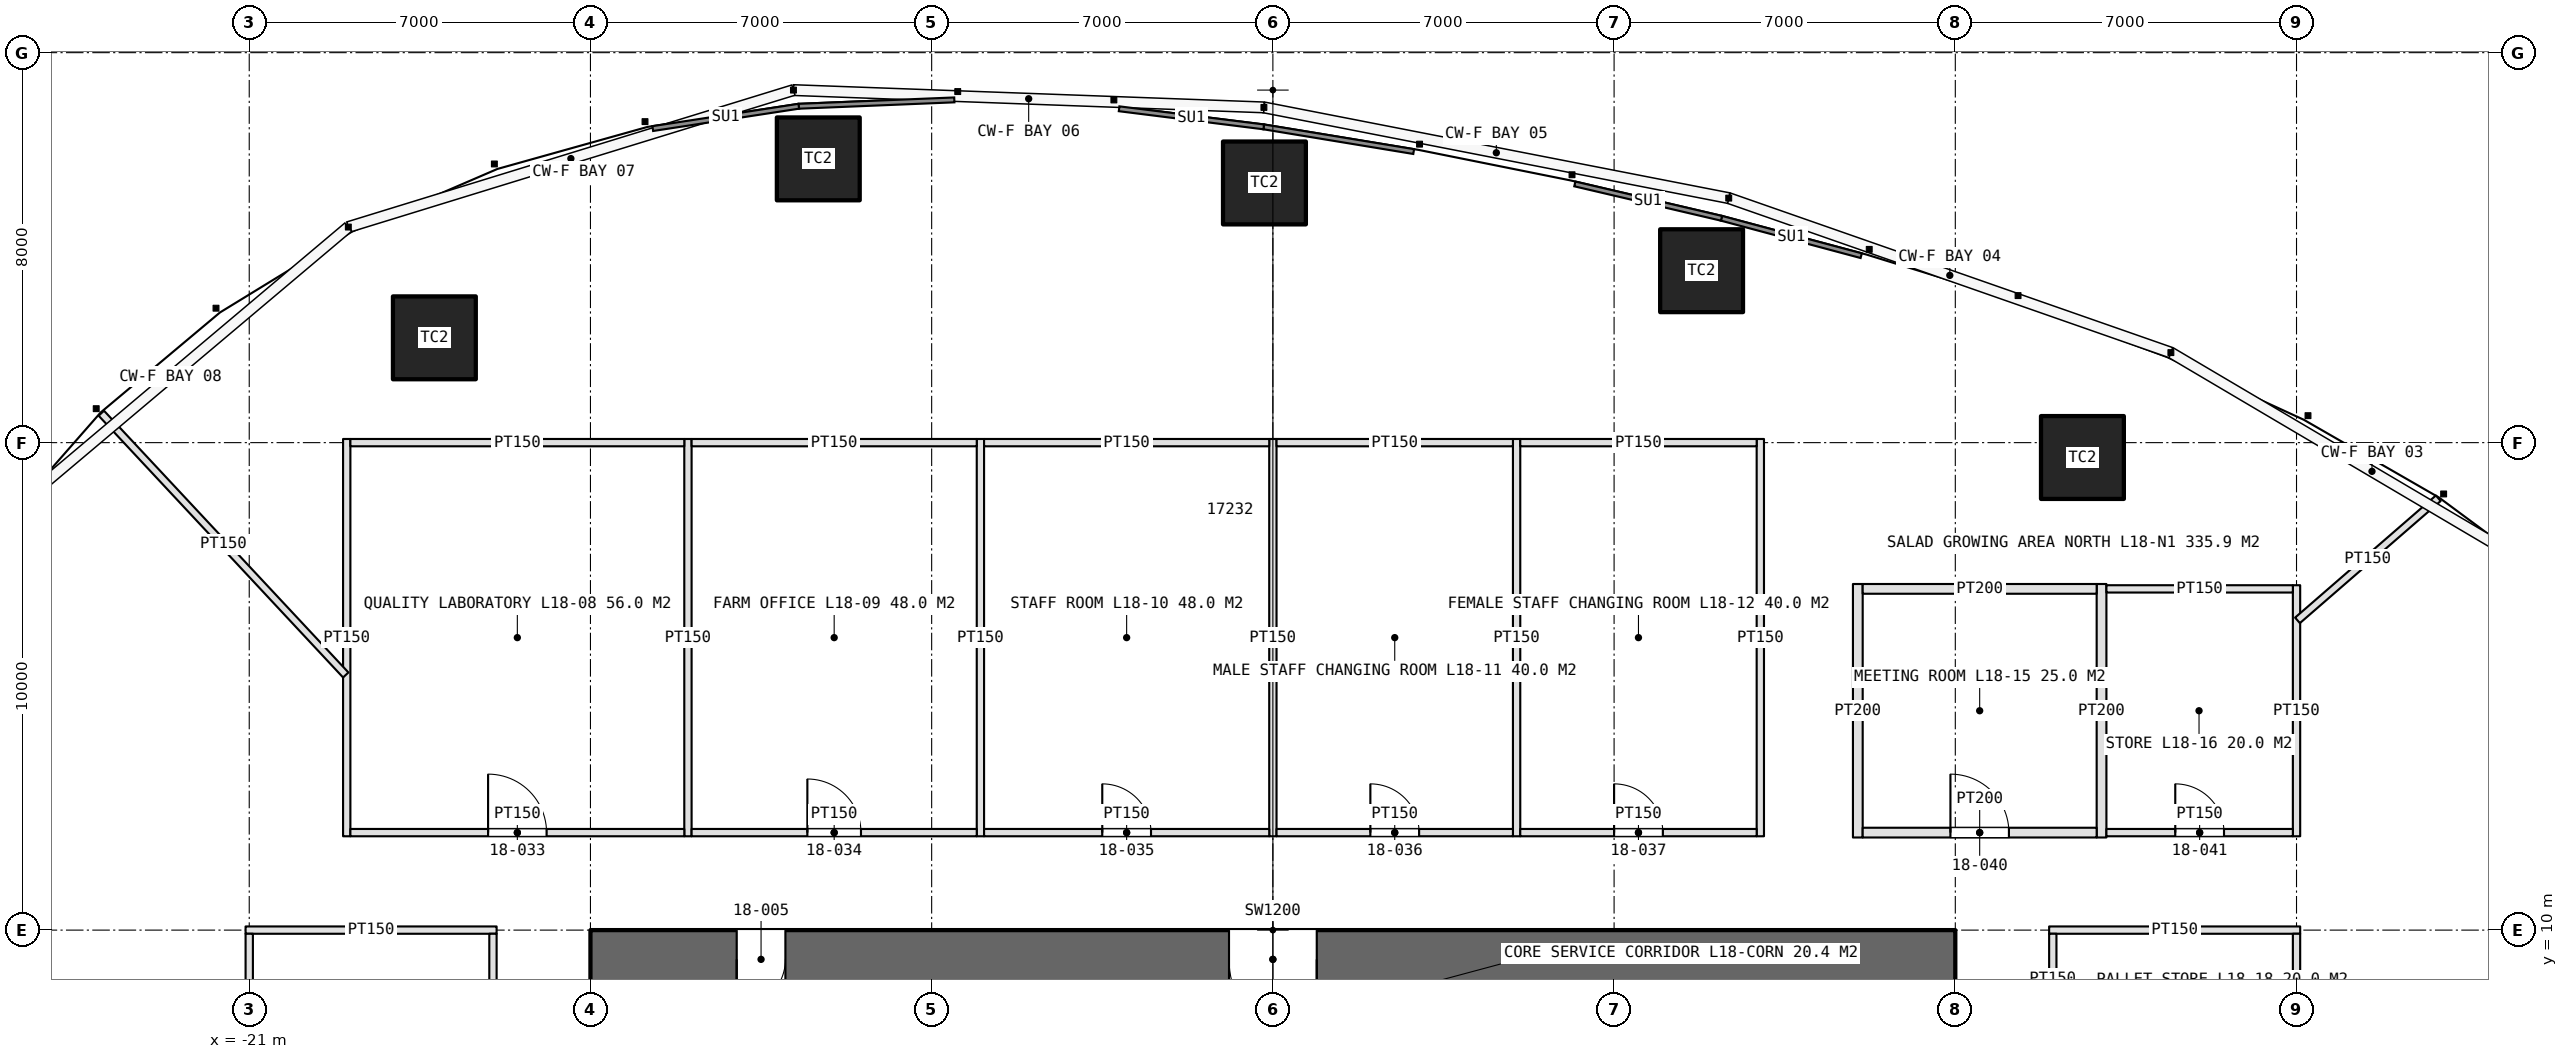
"""IFC4 building model, lengths in metres.
Left out: names, types, materials, properties, quantities, classifications, styles, units other than length and angle.
Written with IfcOpenShell. Run it as: python <this file> out.ifc"""

import sys

from ifc_helpers import new_model, si_unit, direction, frame, frame_2d, origin, origin_2d, place, context, subcontext, project, spatial, rectangle, extrude, element, fill, save


model = new_model("IFC4")
c1 = context("Model", 3, precision=1e-05, world=origin(), true_north=direction((0.0, 1.0)))
c2 = subcontext(c1, "Body", "Model", "MODEL_VIEW")
j1 = project(units=[si_unit("LENGTHUNIT", "METRE"), si_unit("PLANEANGLEUNIT", "RADIAN")], contexts=[c1])
p1 = place(None, origin())
s1 = spatial("IfcSite", under=j1, at=p1, CompositionType="ELEMENT")
p2 = place(p1, origin())
s2 = spatial("IfcBuilding", under=s1, at=p2, CompositionType="ELEMENT")
p3 = place(p2, frame((0.0, 0.0, 90.0)))
s3 = spatial("IfcBuildingStorey", under=s2, at=p3, CompositionType="ELEMENT", Elevation=90.0)
p4 = place(p3, frame((14.0, 9.4, 0.0), z_axis=(0.0, 0.0, 1.0), x_axis=(-1.0, 0.0, 0.0)))
e1 = element("IfcWall", 1, at=p4, inside=s3, PredefinedType="SHEAR", context=c2, shape_type="SweptSolid", body=[
    extrude(rectangle(XDim=28.0, YDim=1.2, at=frame_2d((14.0, 0.0))), origin(), (0.0, 0.0, 1.0), 5.0),
])
p5 = place(p4, frame((24.0, 0.0, 0.0)))
e2 = element("IfcOpeningElement", 2, at=p5, cuts=e1, PredefinedType="OPENING", context=c2, shape_type="SweptSolid", body=[
    extrude(rectangle(XDim=1.0, YDim=2.4, at=frame_2d((0.5, 1.2))), frame((0.0, 0.61, 0.0), z_axis=(0.0, -1.0, 0.0), x_axis=(1.0, 0.0, 0.0)), (0.0, 0.0, 1.0), 1.22),
])
p6 = place(p4, frame((13.1, 0.0, 0.0)))
e3 = element("IfcOpeningElement", 3, at=p6, cuts=e1, PredefinedType="OPENING", context=c2, shape_type="SweptSolid", body=[
    extrude(rectangle(XDim=1.8, YDim=2.4, at=frame_2d((0.9, 1.2))), frame((0.0, 0.61, 0.0), z_axis=(0.0, -1.0, 0.0), x_axis=(1.0, 0.0, 0.0)), (0.0, 0.0, 1.0), 1.22),
])
for number, where, z_axis, x_axis in (
    (4, (16.608, 19.695, 0.0), (0.0, 0.0, 1.0), (1.0, 0.0, 0.0)),
    (5, (8.795, 23.527, 0.0), (0.0, 0.0, 1.0), (1.0, 0.0, 0.0)),
    (6, (-0.173, 25.327, 0.0), (0.0, 0.0, 1.0), (1.0, 0.0, 0.0)),
    (7, (-9.326, 25.821, 0.0), (0.0, 0.0, 1.0), (1.0, 0.0, 0.0)),
    (8, (-17.202, 22.15, 0.0), (0.0, 0.0, 1.0), (1.0, 0.0, 0.0)),
):
    element("IfcColumn", number, at=place(p3, frame(where, z_axis=z_axis, x_axis=x_axis)), inside=s3, PredefinedType="COLUMN", context=c2, shape_type="SweptSolid", body=[
        extrude(rectangle(XDim=1.7, YDim=1.7, at=origin_2d()), origin(), (0.0, 0.0, 1.0), 5.0),
    ])
for number, where, z_axis, x_axis in (
    (9, (-19.0, 11.925, 0.0), (0.0, 0.0, 1.0), (0.0, 1.0, 0.0)),
    (10, (-12.0, 11.925, 0.0), (0.0, 0.0, 1.0), (0.0, 1.0, 0.0)),
    (11, (-6.0, 11.925, 0.0), (0.0, 0.0, 1.0), (0.0, 1.0, 0.0)),
    (12, (0.0, 11.925, 0.0), (0.0, 0.0, 1.0), (0.0, 1.0, 0.0)),
    (13, (5.0, 11.925, 0.0), (0.0, 0.0, 1.0), (0.0, 1.0, 0.0)),
    (14, (10.0, 11.925, 0.0), (0.0, 0.0, 1.0), (0.0, 1.0, 0.0)),
):
    element("IfcWall", number, at=place(p3, frame(where, z_axis=z_axis, x_axis=x_axis)), inside=s3, PredefinedType="PARTITIONING", context=c2, shape_type="SweptSolid", body=[
        extrude(rectangle(XDim=8.15, YDim=0.15, at=frame_2d((4.075, 0.0))), origin(), (0.0, 0.0, 1.0), 3.6),
    ])
p7 = place(p3, frame((-18.925, 12.0, 0.0), z_axis=(0.0, 0.0, 1.0), x_axis=(1.0, 0.0, 0.0)))
e15 = element("IfcWall", 15, at=p7, inside=s3, PredefinedType="PARTITIONING", context=c2, shape_type="SweptSolid", body=[
    extrude(rectangle(XDim=6.85, YDim=0.15, at=frame_2d((3.425, 0.0))), origin(), (0.0, 0.0, 1.0), 3.6),
])
p8 = place(p7, frame((2.825, 0.0, 0.0)))
e16 = element("IfcOpeningElement", 16, at=p8, cuts=e15, PredefinedType="OPENING", context=c2, shape_type="SweptSolid", body=[
    extrude(rectangle(XDim=1.2, YDim=2.3, at=frame_2d((0.6, 1.15))), frame((0.0, 0.085, 0.0), z_axis=(0.0, -1.0, 0.0), x_axis=(1.0, 0.0, 0.0)), (0.0, 0.0, 1.0), 0.17),
])
p9 = place(p3, frame((-18.925, 20.0, 0.0), z_axis=(0.0, 0.0, 1.0), x_axis=(1.0, 0.0, 0.0)))
e17 = element("IfcWall", 17, at=p9, inside=s3, PredefinedType="PARTITIONING", context=c2, shape_type="SweptSolid", body=[
    extrude(rectangle(XDim=6.85, YDim=0.15, at=frame_2d((3.425, 0.0))), origin(), (0.0, 0.0, 1.0), 3.6),
])
p10 = place(p3, frame((-11.925, 12.0, 0.0), z_axis=(0.0, 0.0, 1.0), x_axis=(1.0, 0.0, 0.0)))
e18 = element("IfcWall", 18, at=p10, inside=s3, PredefinedType="PARTITIONING", context=c2, shape_type="SweptSolid", body=[
    extrude(rectangle(XDim=5.85, YDim=0.15, at=frame_2d((2.925, 0.0))), origin(), (0.0, 0.0, 1.0), 3.6),
])
p11 = place(p10, frame((2.375, 0.0, 0.0)))
e19 = element("IfcOpeningElement", 19, at=p11, cuts=e18, PredefinedType="OPENING", context=c2, shape_type="SweptSolid", body=[
    extrude(rectangle(XDim=1.1, YDim=2.3, at=frame_2d((0.55, 1.15))), frame((0.0, 0.085, 0.0), z_axis=(0.0, -1.0, 0.0), x_axis=(1.0, 0.0, 0.0)), (0.0, 0.0, 1.0), 0.17),
])
p12 = place(p3, frame((-11.925, 20.0, 0.0), z_axis=(0.0, 0.0, 1.0), x_axis=(1.0, 0.0, 0.0)))
e20 = element("IfcWall", 20, at=p12, inside=s3, PredefinedType="PARTITIONING", context=c2, shape_type="SweptSolid", body=[
    extrude(rectangle(XDim=5.85, YDim=0.15, at=frame_2d((2.925, 0.0))), origin(), (0.0, 0.0, 1.0), 3.6),
])
p13 = place(p3, frame((-5.925, 12.0, 0.0), z_axis=(0.0, 0.0, 1.0), x_axis=(1.0, 0.0, 0.0)))
e21 = element("IfcWall", 21, at=p13, inside=s3, PredefinedType="PARTITIONING", context=c2, shape_type="SweptSolid", body=[
    extrude(rectangle(XDim=5.85, YDim=0.15, at=frame_2d((2.925, 0.0))), origin(), (0.0, 0.0, 1.0), 3.6),
])
p14 = place(p13, frame((2.425, 0.0, 0.0)))
e22 = element("IfcOpeningElement", 22, at=p14, cuts=e21, PredefinedType="OPENING", context=c2, shape_type="SweptSolid", body=[
    extrude(rectangle(XDim=1.0, YDim=2.2, at=frame_2d((0.5, 1.1))), frame((0.0, 0.085, 0.0), z_axis=(0.0, -1.0, 0.0), x_axis=(1.0, 0.0, 0.0)), (0.0, 0.0, 1.0), 0.17),
])
p15 = place(p3, frame((-5.925, 20.0, 0.0), z_axis=(0.0, 0.0, 1.0), x_axis=(1.0, 0.0, 0.0)))
e23 = element("IfcWall", 23, at=p15, inside=s3, PredefinedType="PARTITIONING", context=c2, shape_type="SweptSolid", body=[
    extrude(rectangle(XDim=5.85, YDim=0.15, at=frame_2d((2.925, 0.0))), origin(), (0.0, 0.0, 1.0), 3.6),
])
p16 = place(p3, frame((0.075, 12.0, 0.0), z_axis=(0.0, 0.0, 1.0), x_axis=(1.0, 0.0, 0.0)))
e24 = element("IfcWall", 24, at=p16, inside=s3, PredefinedType="PARTITIONING", context=c2, shape_type="SweptSolid", body=[
    extrude(rectangle(XDim=4.85, YDim=0.15, at=frame_2d((2.425, 0.0))), origin(), (0.0, 0.0, 1.0), 3.6),
])
p17 = place(p16, frame((1.925, 0.0, 0.0)))
e25 = element("IfcOpeningElement", 25, at=p17, cuts=e24, PredefinedType="OPENING", context=c2, shape_type="SweptSolid", body=[
    extrude(rectangle(XDim=1.0, YDim=2.2, at=frame_2d((0.5, 1.1))), frame((0.0, 0.085, 0.0), z_axis=(0.0, -1.0, 0.0), x_axis=(1.0, 0.0, 0.0)), (0.0, 0.0, 1.0), 0.17),
])
p18 = place(p3, frame((0.075, 20.0, 0.0), z_axis=(0.0, 0.0, 1.0), x_axis=(1.0, 0.0, 0.0)))
e26 = element("IfcWall", 26, at=p18, inside=s3, PredefinedType="PARTITIONING", context=c2, shape_type="SweptSolid", body=[
    extrude(rectangle(XDim=4.85, YDim=0.15, at=frame_2d((2.425, 0.0))), origin(), (0.0, 0.0, 1.0), 3.6),
])
p19 = place(p3, frame((5.075, 12.0, 0.0), z_axis=(0.0, 0.0, 1.0), x_axis=(1.0, 0.0, 0.0)))
e27 = element("IfcWall", 27, at=p19, inside=s3, PredefinedType="PARTITIONING", context=c2, shape_type="SweptSolid", body=[
    extrude(rectangle(XDim=4.85, YDim=0.15, at=frame_2d((2.425, 0.0))), origin(), (0.0, 0.0, 1.0), 3.6),
])
p20 = place(p19, frame((1.925, 0.0, 0.0)))
e28 = element("IfcOpeningElement", 28, at=p20, cuts=e27, PredefinedType="OPENING", context=c2, shape_type="SweptSolid", body=[
    extrude(rectangle(XDim=1.0, YDim=2.2, at=frame_2d((0.5, 1.1))), frame((0.0, 0.085, 0.0), z_axis=(0.0, -1.0, 0.0), x_axis=(1.0, 0.0, 0.0)), (0.0, 0.0, 1.0), 0.17),
])
p21 = place(p3, frame((5.075, 20.0, 0.0), z_axis=(0.0, 0.0, 1.0), x_axis=(1.0, 0.0, 0.0)))
e29 = element("IfcWall", 29, at=p21, inside=s3, PredefinedType="PARTITIONING", context=c2, shape_type="SweptSolid", body=[
    extrude(rectangle(XDim=4.85, YDim=0.15, at=frame_2d((2.425, 0.0))), origin(), (0.0, 0.0, 1.0), 3.6),
])
for number, where, z_axis, x_axis in (
    (30, (12.0, 11.9, 0.0), (0.0, 0.0, 1.0), (0.0, 1.0, 0.0)),
    (31, (17.0, 11.9, 0.0), (0.0, 0.0, 1.0), (0.0, 1.0, 0.0)),
):
    element("IfcWall", number, at=place(p3, frame(where, z_axis=z_axis, x_axis=x_axis)), inside=s3, PredefinedType="PARTITIONING", context=c2, shape_type="SweptSolid", body=[
        extrude(rectangle(XDim=5.2, YDim=0.2, at=frame_2d((2.6, 0.0))), origin(), (0.0, 0.0, 1.0), 3.6),
    ])
p22 = place(p3, frame((21.0, 11.925, 0.0), z_axis=(0.0, 0.0, 1.0), x_axis=(0.0, 1.0, 0.0)))
e32 = element("IfcWall", 32, at=p22, inside=s3, PredefinedType="PARTITIONING", context=c2, shape_type="SweptSolid", body=[
    extrude(rectangle(XDim=5.15, YDim=0.15, at=frame_2d((2.575, 0.0))), origin(), (0.0, 0.0, 1.0), 3.6),
])
p23 = place(p3, frame((12.1, 12.0, 0.0), z_axis=(0.0, 0.0, 1.0), x_axis=(1.0, 0.0, 0.0)))
e33 = element("IfcWall", 33, at=p23, inside=s3, PredefinedType="PARTITIONING", context=c2, shape_type="SweptSolid", body=[
    extrude(rectangle(XDim=4.8, YDim=0.2, at=frame_2d((2.4, 0.0))), origin(), (0.0, 0.0, 1.0), 3.6),
])
p24 = place(p23, frame((1.8, 0.0, 0.0)))
e34 = element("IfcOpeningElement", 34, at=p24, cuts=e33, PredefinedType="OPENING", context=c2, shape_type="SweptSolid", body=[
    extrude(rectangle(XDim=1.2, YDim=2.4, at=frame_2d((0.6, 1.2))), frame((0.0, 0.11, 0.0), z_axis=(0.0, -1.0, 0.0), x_axis=(1.0, 0.0, 0.0)), (0.0, 0.0, 1.0), 0.22),
])
p25 = place(p3, frame((12.1, 17.0, 0.0), z_axis=(0.0, 0.0, 1.0), x_axis=(1.0, 0.0, 0.0)))
e35 = element("IfcWall", 35, at=p25, inside=s3, PredefinedType="PARTITIONING", context=c2, shape_type="SweptSolid", body=[
    extrude(rectangle(XDim=4.8, YDim=0.2, at=frame_2d((2.4, 0.0))), origin(), (0.0, 0.0, 1.0), 3.6),
])
p26 = place(p3, frame((17.1, 12.0, 0.0), z_axis=(0.0, 0.0, 1.0), x_axis=(1.0, 0.0, 0.0)))
e36 = element("IfcWall", 36, at=p26, inside=s3, PredefinedType="PARTITIONING", context=c2, shape_type="SweptSolid", body=[
    extrude(rectangle(XDim=3.825, YDim=0.15, at=frame_2d((1.913, 0.0))), origin(), (0.0, 0.0, 1.0), 3.6),
])
p27 = place(p26, frame((1.413, 0.0, 0.0)))
e37 = element("IfcOpeningElement", 37, at=p27, cuts=e36, PredefinedType="OPENING", context=c2, shape_type="SweptSolid", body=[
    extrude(rectangle(XDim=1.0, YDim=2.2, at=frame_2d((0.5, 1.1))), frame((0.0, 0.085, 0.0), z_axis=(0.0, -1.0, 0.0), x_axis=(1.0, 0.0, 0.0)), (0.0, 0.0, 1.0), 0.17),
])
p28 = place(p3, frame((17.1, 17.0, 0.0), z_axis=(0.0, 0.0, 1.0), x_axis=(1.0, 0.0, 0.0)))
e38 = element("IfcWall", 38, at=p28, inside=s3, PredefinedType="PARTITIONING", context=c2, shape_type="SweptSolid", body=[
    extrude(rectangle(XDim=3.825, YDim=0.15, at=frame_2d((1.913, 0.0))), origin(), (0.0, 0.0, 1.0), 3.6),
])
p29 = place(p3, frame((15.925, 10.0, 0.0), z_axis=(0.0, 0.0, 1.0), x_axis=(1.0, 0.0, 0.0)))
e39 = element("IfcWall", 39, at=p29, inside=s3, PredefinedType="PARTITIONING", context=c2, shape_type="SweptSolid", body=[
    extrude(rectangle(XDim=5.15, YDim=0.15, at=frame_2d((2.575, 0.0))), origin(), (0.0, 0.0, 1.0), 3.6),
])
p30 = place(p3, frame((16.0, 6.075, 0.0), z_axis=(0.0, 0.0, 1.0), x_axis=(0.0, 1.0, 0.0)))
e40 = element("IfcWall", 40, at=p30, inside=s3, PredefinedType="PARTITIONING", context=c2, shape_type="SweptSolid", body=[
    extrude(rectangle(XDim=3.85, YDim=0.15, at=frame_2d((1.925, 0.0))), origin(), (0.0, 0.0, 1.0), 3.6),
])
p31 = place(p30, frame((1.225, 0.0, 0.0)))
e41 = element("IfcOpeningElement", 41, at=p31, cuts=e40, PredefinedType="OPENING", context=c2, shape_type="SweptSolid", body=[
    extrude(rectangle(XDim=1.4, YDim=2.4, at=frame_2d((0.7, 1.2))), frame((0.0, 0.085, 0.0), z_axis=(0.0, -1.0, 0.0), x_axis=(1.0, 0.0, 0.0)), (0.0, 0.0, 1.0), 0.17),
])
p32 = place(p3, frame((21.0, 6.075, 0.0), z_axis=(0.0, 0.0, 1.0), x_axis=(0.0, 1.0, 0.0)))
e42 = element("IfcWall", 42, at=p32, inside=s3, PredefinedType="PARTITIONING", context=c2, shape_type="SweptSolid", body=[
    extrude(rectangle(XDim=3.85, YDim=0.15, at=frame_2d((1.925, 0.0))), origin(), (0.0, 0.0, 1.0), 3.6),
])
p33 = place(p3, frame((-15.925, 10.0, 0.0), z_axis=(0.0, 0.0, 1.0), x_axis=(-1.0, 0.0, 0.0)))
e43 = element("IfcWall", 43, at=p33, inside=s3, PredefinedType="PARTITIONING", context=c2, shape_type="SweptSolid", body=[
    extrude(rectangle(XDim=5.15, YDim=0.15, at=frame_2d((2.575, 0.0))), origin(), (0.0, 0.0, 1.0), 3.6),
])
p34 = place(p3, frame((-16.0, 5.075, 0.0), z_axis=(0.0, 0.0, 1.0), x_axis=(0.0, 1.0, 0.0)))
e44 = element("IfcWall", 44, at=p34, inside=s3, PredefinedType="PARTITIONING", context=c2, shape_type="SweptSolid", body=[
    extrude(rectangle(XDim=4.85, YDim=0.15, at=frame_2d((2.425, 0.0))), origin(), (0.0, 0.0, 1.0), 3.6),
])
p35 = place(p34, frame((1.925, 0.0, 0.0)))
e45 = element("IfcOpeningElement", 45, at=p35, cuts=e44, PredefinedType="OPENING", context=c2, shape_type="SweptSolid", body=[
    extrude(rectangle(XDim=1.0, YDim=2.2, at=frame_2d((0.5, 1.1))), frame((0.0, 0.085, 0.0), z_axis=(0.0, -1.0, 0.0), x_axis=(1.0, 0.0, 0.0)), (0.0, 0.0, 1.0), 0.17),
])
p36 = place(p3, frame((-21.0, 5.075, 0.0), z_axis=(0.0, 0.0, 1.0), x_axis=(0.0, 1.0, 0.0)))
e46 = element("IfcWall", 46, at=p36, inside=s3, PredefinedType="PARTITIONING", context=c2, shape_type="SweptSolid", body=[
    extrude(rectangle(XDim=4.85, YDim=0.15, at=frame_2d((2.425, 0.0))), origin(), (0.0, 0.0, 1.0), 3.6),
])
p37 = place(p3, frame((-19.02, 15.234, 0.0), z_axis=(0.0, 0.0, 1.0), x_axis=(-0.682519491562, 0.730867391281, 0.0)))
e47 = element("IfcWall", 47, at=p37, inside=s3, PredefinedType="PARTITIONING", context=c2, shape_type="SweptSolid", body=[
    extrude(rectangle(XDim=7.347, YDim=0.15, at=frame_2d((3.674, 0.0))), origin(), (0.0, 0.0, 1.0), 3.6),
])
p38 = place(p3, frame((21.02, 16.354, 0.0), z_axis=(0.0, 0.0, 1.0), x_axis=(0.755425653008, 0.655234372402, 0.0)))
e48 = element("IfcWall", 48, at=p38, inside=s3, PredefinedType="PARTITIONING", context=c2, shape_type="SweptSolid", body=[
    extrude(rectangle(XDim=3.823, YDim=0.15, at=frame_2d((1.912, 0.0))), origin(), (0.0, 0.0, 1.0), 3.6),
])
p39 = place(p5, origin())
e49 = element("IfcDoor", 49, at=p39, inside=s3, OperationType="SINGLE_SWING_RIGHT", PredefinedType="DOOR", context=c2, shape_type="SweptSolid", body=[
    extrude(rectangle(XDim=1.0, YDim=2.4, at=frame_2d((0.5, 1.2))), frame((0.0, 0.025, 0.0), z_axis=(0.0, -1.0, 0.0), x_axis=(1.0, 0.0, 0.0)), (0.0, 0.0, 1.0), 0.05),
])
fill(e2, e49)
p40 = place(p6, origin())
e50 = element("IfcDoor", 50, at=p40, inside=s3, OperationType="DOUBLE_DOOR_SINGLE_SWING", PredefinedType="DOOR", context=c2, shape_type="SweptSolid", body=[
    extrude(rectangle(XDim=1.8, YDim=2.4, at=frame_2d((0.9, 1.2))), frame((0.0, 0.025, 0.0), z_axis=(0.0, -1.0, 0.0), x_axis=(1.0, 0.0, 0.0)), (0.0, 0.0, 1.0), 0.05),
])
fill(e3, e50)
p41 = place(p8, origin())
e51 = element("IfcDoor", 51, at=p41, inside=s3, OperationType="SINGLE_SWING_LEFT", PredefinedType="DOOR", context=c2, shape_type="SweptSolid", body=[
    extrude(rectangle(XDim=1.2, YDim=2.3, at=frame_2d((0.6, 1.15))), frame((0.0, 0.025, 0.0), z_axis=(0.0, -1.0, 0.0), x_axis=(1.0, 0.0, 0.0)), (0.0, 0.0, 1.0), 0.05),
])
fill(e16, e51)
p42 = place(p11, origin())
e52 = element("IfcDoor", 52, at=p42, inside=s3, OperationType="SINGLE_SWING_LEFT", PredefinedType="DOOR", context=c2, shape_type="SweptSolid", body=[
    extrude(rectangle(XDim=1.1, YDim=2.3, at=frame_2d((0.55, 1.15))), frame((0.0, 0.025, 0.0), z_axis=(0.0, -1.0, 0.0), x_axis=(1.0, 0.0, 0.0)), (0.0, 0.0, 1.0), 0.05),
])
fill(e19, e52)
p43 = place(p14, origin())
e53 = element("IfcDoor", 53, at=p43, inside=s3, OperationType="SINGLE_SWING_LEFT", PredefinedType="DOOR", context=c2, shape_type="SweptSolid", body=[
    extrude(rectangle(XDim=1.0, YDim=2.2, at=frame_2d((0.5, 1.1))), frame((0.0, 0.025, 0.0), z_axis=(0.0, -1.0, 0.0), x_axis=(1.0, 0.0, 0.0)), (0.0, 0.0, 1.0), 0.05),
])
fill(e22, e53)
p44 = place(p17, origin())
e54 = element("IfcDoor", 54, at=p44, inside=s3, OperationType="SINGLE_SWING_LEFT", PredefinedType="DOOR", context=c2, shape_type="SweptSolid", body=[
    extrude(rectangle(XDim=1.0, YDim=2.2, at=frame_2d((0.5, 1.1))), frame((0.0, 0.025, 0.0), z_axis=(0.0, -1.0, 0.0), x_axis=(1.0, 0.0, 0.0)), (0.0, 0.0, 1.0), 0.05),
])
fill(e25, e54)
p45 = place(p20, origin())
e55 = element("IfcDoor", 55, at=p45, inside=s3, OperationType="SINGLE_SWING_LEFT", PredefinedType="DOOR", context=c2, shape_type="SweptSolid", body=[
    extrude(rectangle(XDim=1.0, YDim=2.2, at=frame_2d((0.5, 1.1))), frame((0.0, 0.025, 0.0), z_axis=(0.0, -1.0, 0.0), x_axis=(1.0, 0.0, 0.0)), (0.0, 0.0, 1.0), 0.05),
])
fill(e28, e55)
p46 = place(p24, origin())
e56 = element("IfcDoor", 56, at=p46, inside=s3, OperationType="SINGLE_SWING_LEFT", PredefinedType="DOOR", context=c2, shape_type="SweptSolid", body=[
    extrude(rectangle(XDim=1.2, YDim=2.4, at=frame_2d((0.6, 1.2))), frame((0.0, 0.025, 0.0), z_axis=(0.0, -1.0, 0.0), x_axis=(1.0, 0.0, 0.0)), (0.0, 0.0, 1.0), 0.05),
])
fill(e34, e56)
p47 = place(p27, origin())
e57 = element("IfcDoor", 57, at=p47, inside=s3, OperationType="SINGLE_SWING_LEFT", PredefinedType="DOOR", context=c2, shape_type="SweptSolid", body=[
    extrude(rectangle(XDim=1.0, YDim=2.2, at=frame_2d((0.5, 1.1))), frame((0.0, 0.025, 0.0), z_axis=(0.0, -1.0, 0.0), x_axis=(1.0, 0.0, 0.0)), (0.0, 0.0, 1.0), 0.05),
])
fill(e37, e57)
save(model, sys.argv[1])
